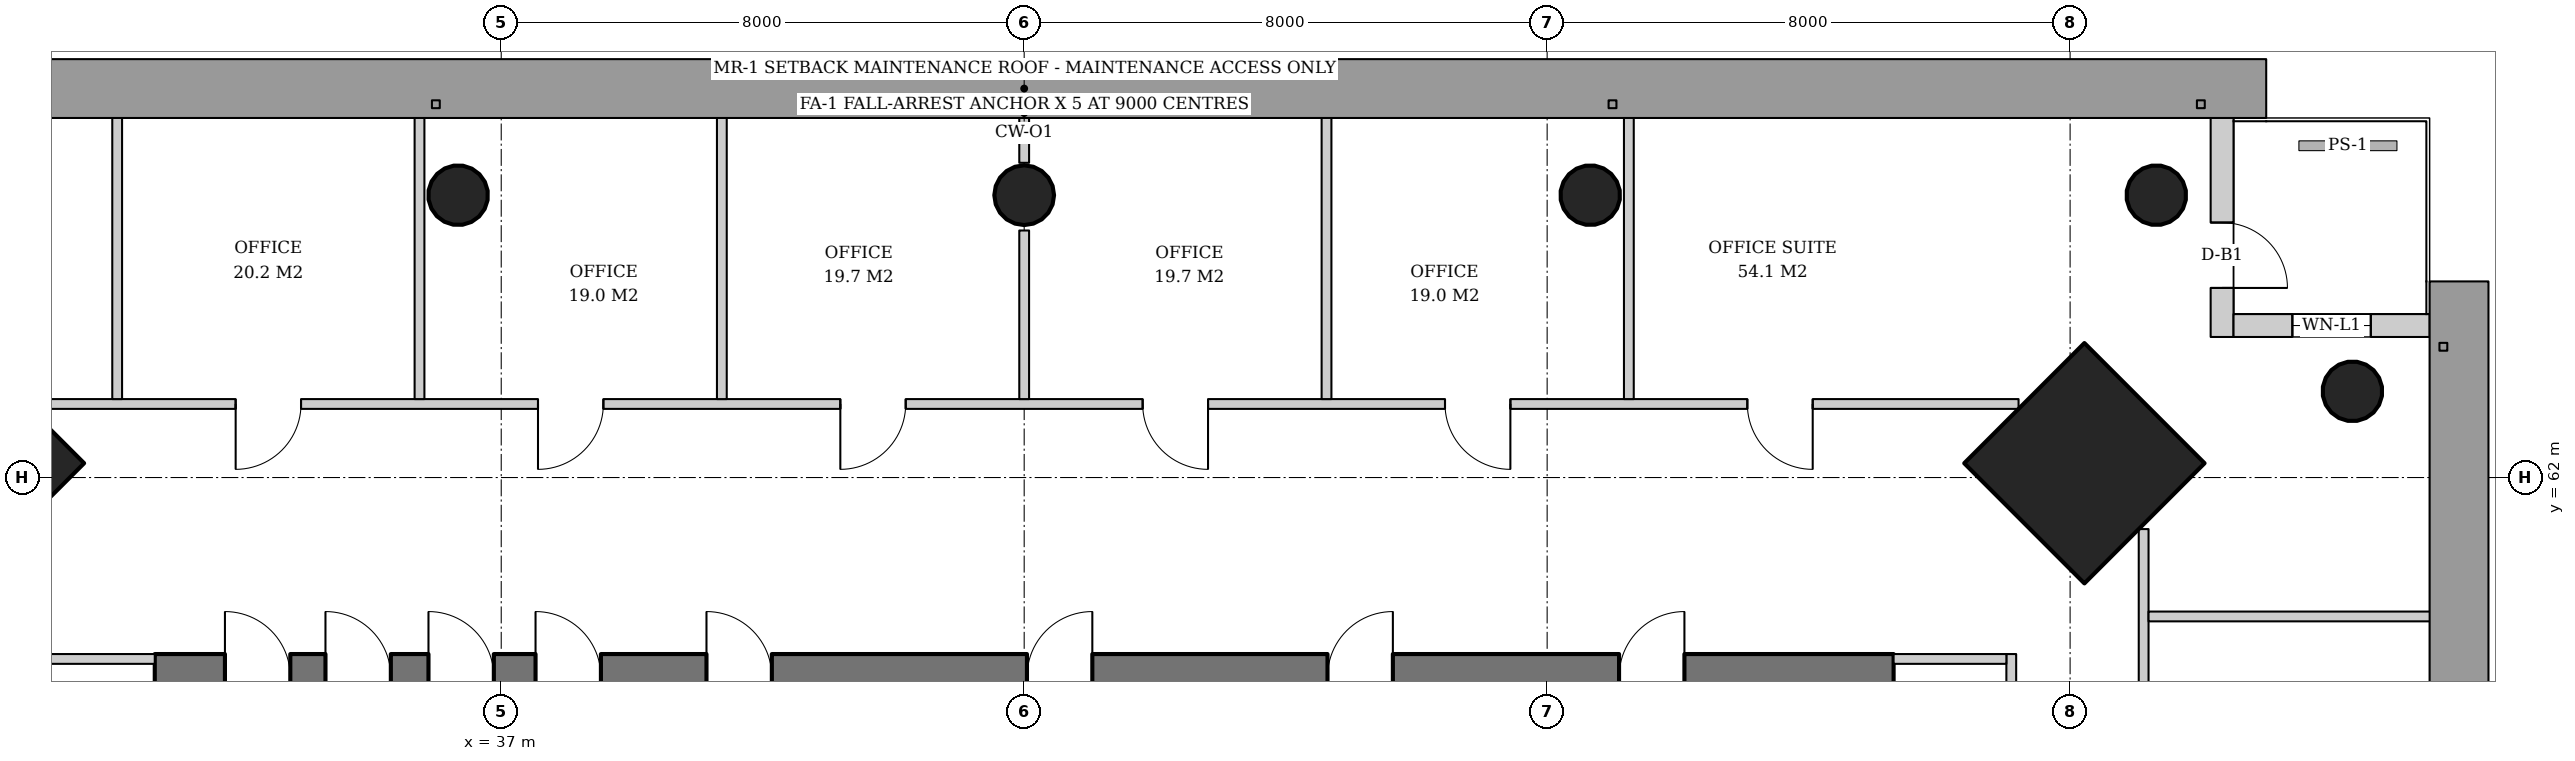
"""IFC4 building model, lengths in metres.
Left out: names, types, materials, properties, quantities, classifications, styles, units other than length and angle.
Written with IfcOpenShell. Run it as: python <this file> out.ifc"""

import sys

from ifc_helpers import new_model, si_unit, direction, frame, frame_2d, origin, origin_2d, place, context, subcontext, project, spatial, rectangle, hollow_circle, extrude, element, fill, save


model = new_model("IFC4")
c1 = context("Model", 3, precision=1e-05, world=origin(), true_north=direction((0.0, 1.0)))
c2 = subcontext(c1, "Body", "Model", "MODEL_VIEW")
j1 = project(units=[si_unit("LENGTHUNIT", "METRE"), si_unit("PLANEANGLEUNIT", "RADIAN")], contexts=[c1])
p1 = place(None, origin())
s1 = spatial("IfcSite", under=j1, at=p1, CompositionType="ELEMENT")
p2 = place(p1, origin())
s2 = spatial("IfcBuilding", under=s1, at=p2, CompositionType="ELEMENT")
p3 = place(p2, frame((0.0, 0.0, 135.0)))
s3 = spatial("IfcBuildingStorey", under=s2, at=p3, CompositionType="ELEMENT", Elevation=135.0)
p4 = place(p3, frame((61.257, 62.257, 0.0), z_axis=(-0.031898107953, -0.031898107953, 0.998981992539), x_axis=(0.707106781187, -0.707106781187, 0.0)))
e1 = element("IfcColumn", 1, at=p4, inside=s3, PredefinedType="COLUMN", context=c2, shape_type="SweptSolid", body=[
    extrude(rectangle(XDim=2.6, YDim=2.6, at=origin_2d()), origin(), (0.0, 0.0, 1.0), 3.804),
])
p5 = place(p3, frame((65.357, 63.357, 0.0), z_axis=(-0.031962158256, -0.031962158256, 0.998977898093), x_axis=(0.707106781187, -0.707106781187, 0.0)))
e2 = element("IfcColumn", 2, at=p5, inside=s3, PredefinedType="COLUMN", context=c2, shape_type="SweptSolid", body=[
    extrude(hollow_circle(Radius=0.457, WallThickness=0.03, at=origin_2d()), origin(), (0.0, 0.0, 1.0), 3.804),
])
p6 = place(p3, frame((28.743, 62.257, 0.0), z_axis=(0.031898107953, -0.031898107953, 0.998981992539), x_axis=(0.707106781187, 0.707106781187, 0.0)))
e3 = element("IfcColumn", 3, at=p6, inside=s3, PredefinedType="COLUMN", context=c2, shape_type="SweptSolid", body=[
    extrude(rectangle(XDim=2.6, YDim=2.6, at=origin_2d()), origin(), (0.0, 0.0, 1.0), 3.804),
])
p7 = place(p3, frame((62.357, 66.357, 0.0), z_axis=(-0.031962158256, -0.031962158256, 0.998977898093), x_axis=(0.707106781187, -0.707106781187, 0.0)))
e4 = element("IfcColumn", 4, at=p7, inside=s3, PredefinedType="COLUMN", context=c2, shape_type="SweptSolid", body=[
    extrude(hollow_circle(Radius=0.457, WallThickness=0.03, at=origin_2d()), origin(), (0.0, 0.0, 1.0), 3.804),
])
p8 = place(p3, frame((53.678, 66.357, 0.0), z_axis=(-0.015923015547, -0.031974442509, 0.999361842679), x_axis=(0.895145027055, -0.445775033553, 0.0)))
e5 = element("IfcColumn", 5, at=p8, inside=s3, PredefinedType="COLUMN", context=c2, shape_type="SweptSolid", body=[
    extrude(hollow_circle(Radius=0.457, WallThickness=0.03, at=origin_2d()), origin(), (0.0, 0.0, 1.0), 3.802),
])
p9 = place(p3, frame((45.0, 66.357, 0.0), z_axis=(0.0, -0.031978496719, 0.999488557087), x_axis=(1.0, 0.0, 0.0)))
e6 = element("IfcColumn", 6, at=p9, inside=s3, PredefinedType="COLUMN", context=c2, shape_type="SweptSolid", body=[
    extrude(hollow_circle(Radius=0.457, WallThickness=0.03, at=origin_2d()), origin(), (0.0, 0.0, 1.0), 3.802),
])
p10 = place(p3, frame((36.322, 66.357, 0.0), z_axis=(0.015923015547, -0.031974442509, 0.999361842679), x_axis=(0.895145027055, 0.445775033553, 0.0)))
e7 = element("IfcColumn", 7, at=p10, inside=s3, PredefinedType="COLUMN", context=c2, shape_type="SweptSolid", body=[
    extrude(hollow_circle(Radius=0.457, WallThickness=0.03, at=origin_2d()), origin(), (0.0, 0.0, 1.0), 3.802),
])
p11 = place(p3, frame((31.7, 58.95, 0.0), z_axis=(0.0, 0.0, 1.0), x_axis=(1.0, 0.0, 0.0)))
e8 = element("IfcWall", 8, at=p11, inside=s3, PredefinedType="SHEAR", context=c2, shape_type="SweptSolid", body=[
    extrude(rectangle(XDim=26.6, YDim=0.7, at=frame_2d((13.3, 0.0))), origin(), (0.0, 0.0, 1.0), 3.8),
])
p12 = place(p11, frame((17.94, 0.0, 0.0)))
e9 = element("IfcOpeningElement", 9, at=p12, cuts=e8, PredefinedType="OPENING", context=c2, shape_type="SweptSolid", body=[
    extrude(rectangle(XDim=1.0, YDim=2.1, at=frame_2d((0.5, 1.05))), frame((0.0, 0.36, 0.0), z_axis=(0.0, -1.0, 0.0), x_axis=(1.0, 0.0, 0.0)), (0.0, 0.0, 1.0), 0.72),
])
p13 = place(p11, frame((5.825, 0.0, 0.0)))
e10 = element("IfcOpeningElement", 10, at=p13, cuts=e8, PredefinedType="OPENING", context=c2, shape_type="SweptSolid", body=[
    extrude(rectangle(XDim=1.0, YDim=2.1, at=frame_2d((0.5, 1.05))), frame((0.0, 0.36, 0.0), z_axis=(0.0, -1.0, 0.0), x_axis=(1.0, 0.0, 0.0)), (0.0, 0.0, 1.0), 0.72),
])
p14 = place(p11, frame((1.073, 0.0, 0.0)))
e11 = element("IfcOpeningElement", 11, at=p14, cuts=e8, PredefinedType="OPENING", context=c2, shape_type="SweptSolid", body=[
    extrude(rectangle(XDim=1.0, YDim=2.1, at=frame_2d((0.5, 1.05))), frame((0.0, 0.36, 0.0), z_axis=(0.0, -1.0, 0.0), x_axis=(1.0, 0.0, 0.0)), (0.0, 0.0, 1.0), 0.72),
])
p15 = place(p11, frame((2.611, 0.0, 0.0)))
e12 = element("IfcOpeningElement", 12, at=p15, cuts=e8, PredefinedType="OPENING", context=c2, shape_type="SweptSolid", body=[
    extrude(rectangle(XDim=1.0, YDim=2.1, at=frame_2d((0.5, 1.05))), frame((0.0, 0.36, 0.0), z_axis=(0.0, -1.0, 0.0), x_axis=(1.0, 0.0, 0.0)), (0.0, 0.0, 1.0), 0.72),
])
p16 = place(p11, frame((4.187, 0.0, 0.0)))
e13 = element("IfcOpeningElement", 13, at=p16, cuts=e8, PredefinedType="OPENING", context=c2, shape_type="SweptSolid", body=[
    extrude(rectangle(XDim=1.0, YDim=2.1, at=frame_2d((0.5, 1.05))), frame((0.0, 0.36, 0.0), z_axis=(0.0, -1.0, 0.0), x_axis=(1.0, 0.0, 0.0)), (0.0, 0.0, 1.0), 0.72),
])
p17 = place(p11, frame((8.44, 0.0, 0.0)))
e14 = element("IfcOpeningElement", 14, at=p17, cuts=e8, PredefinedType="OPENING", context=c2, shape_type="SweptSolid", body=[
    extrude(rectangle(XDim=1.0, YDim=2.1, at=frame_2d((0.5, 1.05))), frame((0.0, 0.36, 0.0), z_axis=(0.0, -1.0, 0.0), x_axis=(1.0, 0.0, 0.0)), (0.0, 0.0, 1.0), 0.72),
])
p18 = place(p11, frame((13.342, 0.0, 0.0)))
e15 = element("IfcOpeningElement", 15, at=p18, cuts=e8, PredefinedType="OPENING", context=c2, shape_type="SweptSolid", body=[
    extrude(rectangle(XDim=1.0, YDim=2.1, at=frame_2d((0.5, 1.05))), frame((0.0, 0.36, 0.0), z_axis=(0.0, -1.0, 0.0), x_axis=(1.0, 0.0, 0.0)), (0.0, 0.0, 1.0), 0.72),
])
p19 = place(p11, frame((22.4, 0.0, 0.0)))
e16 = element("IfcOpeningElement", 16, at=p19, cuts=e8, PredefinedType="OPENING", context=c2, shape_type="SweptSolid", body=[
    extrude(rectangle(XDim=1.0, YDim=2.1, at=frame_2d((0.5, 1.05))), frame((0.0, 0.36, 0.0), z_axis=(0.0, -1.0, 0.0), x_axis=(1.0, 0.0, 0.0)), (0.0, 0.0, 1.0), 0.72),
])
p20 = place(p3, frame((63.325, 67.5, 0.0), z_axis=(0.0, 0.0, 1.0), x_axis=(0.0, -1.0, 0.0)))
e17 = element("IfcWall", 17, at=p20, inside=s3, PredefinedType="SOLIDWALL", context=c2, shape_type="SweptSolid", body=[
    extrude(rectangle(XDim=3.35, YDim=0.35, at=frame_2d((1.675, 0.0))), origin(), (0.0, 0.0, 1.0), 3.62),
])
p21 = place(p20, frame((1.6, 0.0, 0.0)))
e18 = element("IfcOpeningElement", 18, at=p21, cuts=e17, PredefinedType="OPENING", context=c2, shape_type="SweptSolid", body=[
    extrude(rectangle(XDim=1.0, YDim=2.4, at=frame_2d((0.5, 1.2))), frame((0.0, 0.185, 0.0), z_axis=(0.0, -1.0, 0.0), x_axis=(1.0, 0.0, 0.0)), (0.0, 0.0, 1.0), 0.37),
])
p22 = place(p3, frame((63.5, 64.325, 0.0), z_axis=(0.0, 0.0, 1.0), x_axis=(1.0, 0.0, 0.0)))
e19 = element("IfcWall", 19, at=p22, inside=s3, PredefinedType="SOLIDWALL", context=c2, shape_type="SweptSolid", body=[
    extrude(rectangle(XDim=3.0, YDim=0.35, at=frame_2d((1.5, 0.0))), origin(), (0.0, 0.0, 1.0), 3.62),
])
p23 = place(p22, frame((0.9, 0.0, 0.6)))
e20 = element("IfcOpeningElement", 20, at=p23, cuts=e19, PredefinedType="OPENING", context=c2, shape_type="SweptSolid", body=[
    extrude(rectangle(XDim=1.2, YDim=2.55, at=frame_2d((0.6, 1.275))), frame((0.0, 0.185, 0.0), z_axis=(0.0, -1.0, 0.0), x_axis=(1.0, 0.0, 0.0)), (0.0, 0.0, 1.0), 0.37),
])
p24 = place(p3, frame((60.1, 48.025, 0.0), z_axis=(0.0, 0.0, 1.0), x_axis=(0.0, 1.0, 0.0)))
e21 = element("IfcWall", 21, at=p24, inside=s3, PredefinedType="PARTITIONING", context=c2, shape_type="SweptSolid", body=[
    extrude(rectangle(XDim=11.275, YDim=0.15, at=frame_2d((5.638, 0.0))), origin(), (0.0, 0.0, 1.0), 2.806),
])
p25 = place(p24, frame((5.137, 0.0, 0.0)))
e22 = element("IfcOpeningElement", 22, at=p25, cuts=e21, PredefinedType="OPENING", context=c2, shape_type="SweptSolid", body=[
    extrude(rectangle(XDim=1.0, YDim=2.1, at=frame_2d((0.5, 1.05))), frame((0.0, 0.085, 0.0), z_axis=(0.0, -1.0, 0.0), x_axis=(1.0, 0.0, 0.0)), (0.0, 0.0, 1.0), 0.17),
])
for number, where, z_axis, x_axis in (
    (23, (58.3, 59.225, 0.0), (0.0, 0.0, 1.0), (1.0, 0.0, 0.0)),
    (24, (31.7, 59.225, 0.0), (0.0, 0.0, 1.0), (-1.0, 0.0, 0.0)),
):
    element("IfcWall", number, at=place(p3, frame(where, z_axis=z_axis, x_axis=x_axis)), inside=s3, PredefinedType="PARTITIONING", context=c2, shape_type="SweptSolid", body=[
        extrude(rectangle(XDim=1.725, YDim=0.15, at=frame_2d((0.862, 0.0))), origin(), (0.0, 0.0, 1.0), 3.62),
    ])
p26 = place(p3, frame((62.125, 30.789, 0.0), z_axis=(0.0, 0.0, 1.0), x_axis=(0.0, 1.0, 0.0)))
e25 = element("IfcWall", 25, at=p26, inside=s3, PredefinedType="PARTITIONING", context=c2, shape_type="SweptSolid", body=[
    extrude(rectangle(XDim=30.423, YDim=0.15, at=frame_2d((15.211, 0.0))), origin(), (0.0, 0.0, 1.0), 2.72),
])
p27 = place(p26, frame((3.149, 0.0, 0.0)))
e26 = element("IfcOpeningElement", 26, at=p27, cuts=e25, PredefinedType="OPENING", context=c2, shape_type="SweptSolid", body=[
    extrude(rectangle(XDim=1.0, YDim=2.1, at=frame_2d((0.5, 1.05))), frame((0.0, 0.085, 0.0), z_axis=(0.0, -1.0, 0.0), x_axis=(1.0, 0.0, 0.0)), (0.0, 0.0, 1.0), 0.17),
])
p28 = place(p26, frame((7.774, 0.0, 0.0)))
e27 = element("IfcOpeningElement", 27, at=p28, cuts=e25, PredefinedType="OPENING", context=c2, shape_type="SweptSolid", body=[
    extrude(rectangle(XDim=1.0, YDim=2.1, at=frame_2d((0.5, 1.05))), frame((0.0, 0.085, 0.0), z_axis=(0.0, -1.0, 0.0), x_axis=(1.0, 0.0, 0.0)), (0.0, 0.0, 1.0), 0.17),
])
p29 = place(p26, frame((12.399, 0.0, 0.0)))
e28 = element("IfcOpeningElement", 28, at=p29, cuts=e25, PredefinedType="OPENING", context=c2, shape_type="SweptSolid", body=[
    extrude(rectangle(XDim=1.0, YDim=2.1, at=frame_2d((0.5, 1.05))), frame((0.0, 0.085, 0.0), z_axis=(0.0, -1.0, 0.0), x_axis=(1.0, 0.0, 0.0)), (0.0, 0.0, 1.0), 0.17),
])
p30 = place(p26, frame((17.024, 0.0, 0.0)))
e29 = element("IfcOpeningElement", 29, at=p30, cuts=e25, PredefinedType="OPENING", context=c2, shape_type="SweptSolid", body=[
    extrude(rectangle(XDim=1.0, YDim=2.1, at=frame_2d((0.5, 1.05))), frame((0.0, 0.085, 0.0), z_axis=(0.0, -1.0, 0.0), x_axis=(1.0, 0.0, 0.0)), (0.0, 0.0, 1.0), 0.17),
])
p31 = place(p26, frame((21.649, 0.0, 0.0)))
e30 = element("IfcOpeningElement", 30, at=p31, cuts=e25, PredefinedType="OPENING", context=c2, shape_type="SweptSolid", body=[
    extrude(rectangle(XDim=1.0, YDim=2.1, at=frame_2d((0.5, 1.05))), frame((0.0, 0.085, 0.0), z_axis=(0.0, -1.0, 0.0), x_axis=(1.0, 0.0, 0.0)), (0.0, 0.0, 1.0), 0.17),
])
p32 = place(p3, frame((62.2, 59.875, 0.0), z_axis=(0.0, 0.0, 1.0), x_axis=(1.0, 0.0, 0.0)))
e31 = element("IfcWall", 31, at=p32, inside=s3, PredefinedType="PARTITIONING", context=c2, shape_type="SweptSolid", body=[
    extrude(rectangle(XDim=4.34, YDim=0.15, at=frame_2d((2.17, 0.0))), origin(), (0.0, 0.0, 1.0), 2.82),
])
p33 = place(p3, frame((60.211, 63.125, 0.0), z_axis=(0.0, 0.0, 1.0), x_axis=(-1.0, 0.0, 0.0)))
e32 = element("IfcWall", 32, at=p33, inside=s3, PredefinedType="PARTITIONING", context=c2, shape_type="SweptSolid", body=[
    extrude(rectangle(XDim=30.423, YDim=0.15, at=frame_2d((15.211, 0.0))), origin(), (0.0, 0.0, 1.0), 2.72),
])
p34 = place(p33, frame((3.149, 0.0, 0.0)))
e33 = element("IfcOpeningElement", 33, at=p34, cuts=e32, PredefinedType="OPENING", context=c2, shape_type="SweptSolid", body=[
    extrude(rectangle(XDim=1.0, YDim=2.1, at=frame_2d((0.5, 1.05))), frame((0.0, 0.085, 0.0), z_axis=(0.0, -1.0, 0.0), x_axis=(1.0, 0.0, 0.0)), (0.0, 0.0, 1.0), 0.17),
])
p35 = place(p33, frame((7.774, 0.0, 0.0)))
e34 = element("IfcOpeningElement", 34, at=p35, cuts=e32, PredefinedType="OPENING", context=c2, shape_type="SweptSolid", body=[
    extrude(rectangle(XDim=1.0, YDim=2.1, at=frame_2d((0.5, 1.05))), frame((0.0, 0.085, 0.0), z_axis=(0.0, -1.0, 0.0), x_axis=(1.0, 0.0, 0.0)), (0.0, 0.0, 1.0), 0.17),
])
p36 = place(p33, frame((12.399, 0.0, 0.0)))
e35 = element("IfcOpeningElement", 35, at=p36, cuts=e32, PredefinedType="OPENING", context=c2, shape_type="SweptSolid", body=[
    extrude(rectangle(XDim=1.0, YDim=2.1, at=frame_2d((0.5, 1.05))), frame((0.0, 0.085, 0.0), z_axis=(0.0, -1.0, 0.0), x_axis=(1.0, 0.0, 0.0)), (0.0, 0.0, 1.0), 0.17),
])
p37 = place(p33, frame((17.024, 0.0, 0.0)))
e36 = element("IfcOpeningElement", 36, at=p37, cuts=e32, PredefinedType="OPENING", context=c2, shape_type="SweptSolid", body=[
    extrude(rectangle(XDim=1.0, YDim=2.1, at=frame_2d((0.5, 1.05))), frame((0.0, 0.085, 0.0), z_axis=(0.0, -1.0, 0.0), x_axis=(1.0, 0.0, 0.0)), (0.0, 0.0, 1.0), 0.17),
])
p38 = place(p33, frame((21.649, 0.0, 0.0)))
e37 = element("IfcOpeningElement", 37, at=p38, cuts=e32, PredefinedType="OPENING", context=c2, shape_type="SweptSolid", body=[
    extrude(rectangle(XDim=1.0, YDim=2.1, at=frame_2d((0.5, 1.05))), frame((0.0, 0.085, 0.0), z_axis=(0.0, -1.0, 0.0), x_axis=(1.0, 0.0, 0.0)), (0.0, 0.0, 1.0), 0.17),
])
p39 = place(p33, frame((26.274, 0.0, 0.0)))
e38 = element("IfcOpeningElement", 38, at=p39, cuts=e32, PredefinedType="OPENING", context=c2, shape_type="SweptSolid", body=[
    extrude(rectangle(XDim=1.0, YDim=2.1, at=frame_2d((0.5, 1.05))), frame((0.0, 0.085, 0.0), z_axis=(0.0, -1.0, 0.0), x_axis=(1.0, 0.0, 0.0)), (0.0, 0.0, 1.0), 0.17),
])
for number, where, z_axis, x_axis in (
    (39, (54.25, 63.2, 0.0), (0.0, 0.0, 1.0), (0.0, 1.0, 0.0)),
    (40, (49.625, 63.2, 0.0), (0.0, 0.0, 1.0), (0.0, 1.0, 0.0)),
):
    element("IfcWall", number, at=place(p3, frame(where, z_axis=z_axis, x_axis=x_axis)), inside=s3, PredefinedType="PARTITIONING", context=c2, shape_type="SweptSolid", body=[
        extrude(rectangle(XDim=4.34, YDim=0.15, at=frame_2d((2.17, 0.0))), origin(), (0.0, 0.0, 1.0), 2.82),
    ])
p40 = place(p3, frame((45.0, 63.2, 0.0), z_axis=(0.0, 0.0, 1.0), x_axis=(0.0, 1.0, 0.0)))
e41 = element("IfcWall", 41, at=p40, inside=s3, PredefinedType="PARTITIONING", context=c2, shape_type="SweptSolid", body=[
    extrude(rectangle(XDim=2.579, YDim=0.15, at=frame_2d((1.29, 0.0))), origin(), (0.0, 0.0, 1.0), 3.62),
])
p41 = place(p3, frame((45.0, 66.814, 0.0), z_axis=(0.0, 0.0, 1.0), x_axis=(0.0, 1.0, 0.0)))
e42 = element("IfcWall", 42, at=p41, inside=s3, PredefinedType="PARTITIONING", context=c2, shape_type="SweptSolid", body=[
    extrude(rectangle(XDim=0.726, YDim=0.15, at=frame_2d((0.363, 0.0))), origin(), (0.0, 0.0, 1.0), 3.62),
])
for number, where, z_axis, x_axis in (
    (43, (40.375, 63.2, 0.0), (0.0, 0.0, 1.0), (0.0, 1.0, 0.0)),
    (44, (35.75, 63.2, 0.0), (0.0, 0.0, 1.0), (0.0, 1.0, 0.0)),
    (45, (31.125, 63.2, 0.0), (0.0, 0.0, 1.0), (0.0, 1.0, 0.0)),
):
    element("IfcWall", number, at=place(p3, frame(where, z_axis=z_axis, x_axis=x_axis)), inside=s3, PredefinedType="PARTITIONING", context=c2, shape_type="SweptSolid", body=[
        extrude(rectangle(XDim=4.34, YDim=0.15, at=frame_2d((2.17, 0.0))), origin(), (0.0, 0.0, 1.0), 2.82),
    ])
p42 = place(p21, origin())
e46 = element("IfcDoor", 46, at=p42, inside=s3, OperationType="SINGLE_SWING_RIGHT", PredefinedType="DOOR", context=c2, shape_type="SweptSolid", body=[
    extrude(rectangle(XDim=1.0, YDim=2.4, at=frame_2d((0.5, 1.2))), frame((0.0, 0.025, 0.0), z_axis=(0.0, -1.0, 0.0), x_axis=(1.0, 0.0, 0.0)), (0.0, 0.0, 1.0), 0.05),
])
fill(e18, e46)
p43 = place(p23, origin())
e47 = element("IfcWindow", 47, at=p43, inside=s3, PartitioningType="SINGLE_PANEL", PredefinedType="WINDOW", context=c2, shape_type="SweptSolid", body=[
    extrude(rectangle(XDim=1.2, YDim=2.55, at=frame_2d((0.6, 1.275))), frame((0.0, 0.03, 0.0), z_axis=(0.0, -1.0, 0.0), x_axis=(1.0, 0.0, 0.0)), (0.0, 0.0, 1.0), 0.06),
])
fill(e20, e47)
p44 = place(p12, origin())
e48 = element("IfcDoor", 48, at=p44, inside=s3, OperationType="SINGLE_SWING_RIGHT", PredefinedType="DOOR", context=c2, shape_type="SweptSolid", body=[
    extrude(rectangle(XDim=1.0, YDim=2.1, at=frame_2d((0.5, 1.05))), frame((0.0, 0.025, 0.0), z_axis=(0.0, -1.0, 0.0), x_axis=(1.0, 0.0, 0.0)), (0.0, 0.0, 1.0), 0.05),
])
fill(e9, e48)
p45 = place(p13, origin())
e49 = element("IfcDoor", 49, at=p45, inside=s3, OperationType="SINGLE_SWING_LEFT", PredefinedType="DOOR", context=c2, shape_type="SweptSolid", body=[
    extrude(rectangle(XDim=1.0, YDim=2.1, at=frame_2d((0.5, 1.05))), frame((0.0, 0.025, 0.0), z_axis=(0.0, -1.0, 0.0), x_axis=(1.0, 0.0, 0.0)), (0.0, 0.0, 1.0), 0.05),
])
fill(e10, e49)
p46 = place(p34, origin())
e50 = element("IfcDoor", 50, at=p46, inside=s3, OperationType="SINGLE_SWING_LEFT", PredefinedType="DOOR", context=c2, shape_type="SweptSolid", body=[
    extrude(rectangle(XDim=1.0, YDim=2.1, at=frame_2d((0.5, 1.05))), frame((0.0, 0.025, 0.0), z_axis=(0.0, -1.0, 0.0), x_axis=(1.0, 0.0, 0.0)), (0.0, 0.0, 1.0), 0.05),
])
fill(e33, e50)
p47 = place(p35, origin())
e51 = element("IfcDoor", 51, at=p47, inside=s3, OperationType="SINGLE_SWING_LEFT", PredefinedType="DOOR", context=c2, shape_type="SweptSolid", body=[
    extrude(rectangle(XDim=1.0, YDim=2.1, at=frame_2d((0.5, 1.05))), frame((0.0, 0.025, 0.0), z_axis=(0.0, -1.0, 0.0), x_axis=(1.0, 0.0, 0.0)), (0.0, 0.0, 1.0), 0.05),
])
fill(e34, e51)
p48 = place(p36, origin())
e52 = element("IfcDoor", 52, at=p48, inside=s3, OperationType="SINGLE_SWING_LEFT", PredefinedType="DOOR", context=c2, shape_type="SweptSolid", body=[
    extrude(rectangle(XDim=1.0, YDim=2.1, at=frame_2d((0.5, 1.05))), frame((0.0, 0.025, 0.0), z_axis=(0.0, -1.0, 0.0), x_axis=(1.0, 0.0, 0.0)), (0.0, 0.0, 1.0), 0.05),
])
fill(e35, e52)
p49 = place(p37, origin())
e53 = element("IfcDoor", 53, at=p49, inside=s3, OperationType="SINGLE_SWING_RIGHT", PredefinedType="DOOR", context=c2, shape_type="SweptSolid", body=[
    extrude(rectangle(XDim=1.0, YDim=2.1, at=frame_2d((0.5, 1.05))), frame((0.0, 0.025, 0.0), z_axis=(0.0, -1.0, 0.0), x_axis=(1.0, 0.0, 0.0)), (0.0, 0.0, 1.0), 0.05),
])
fill(e36, e53)
p50 = place(p38, origin())
e54 = element("IfcDoor", 54, at=p50, inside=s3, OperationType="SINGLE_SWING_RIGHT", PredefinedType="DOOR", context=c2, shape_type="SweptSolid", body=[
    extrude(rectangle(XDim=1.0, YDim=2.1, at=frame_2d((0.5, 1.05))), frame((0.0, 0.025, 0.0), z_axis=(0.0, -1.0, 0.0), x_axis=(1.0, 0.0, 0.0)), (0.0, 0.0, 1.0), 0.05),
])
fill(e37, e54)
p51 = place(p39, origin())
e55 = element("IfcDoor", 55, at=p51, inside=s3, OperationType="SINGLE_SWING_RIGHT", PredefinedType="DOOR", context=c2, shape_type="SweptSolid", body=[
    extrude(rectangle(XDim=1.0, YDim=2.1, at=frame_2d((0.5, 1.05))), frame((0.0, 0.025, 0.0), z_axis=(0.0, -1.0, 0.0), x_axis=(1.0, 0.0, 0.0)), (0.0, 0.0, 1.0), 0.05),
])
fill(e38, e55)
save(model, sys.argv[1])
